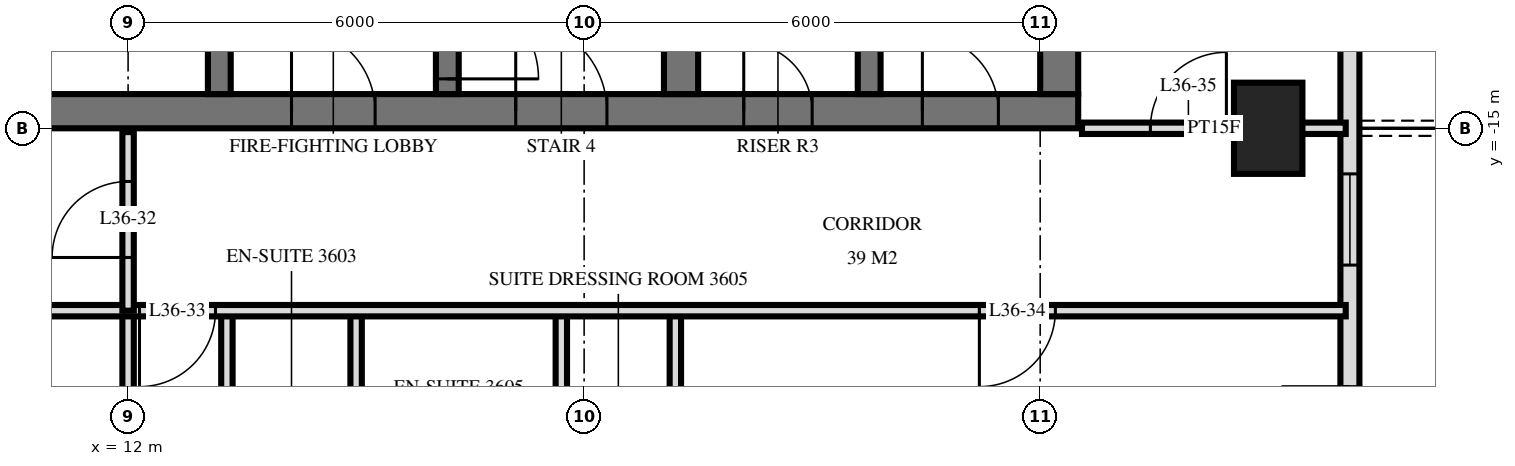
"""IFC4 building model, lengths in metres.
Left out: names, types, materials, properties, quantities, classifications, styles, units other than length and angle.
Written with IfcOpenShell. Run it as: python <this file> out.ifc"""

import sys

from ifc_helpers import new_model, si_unit, direction, frame, frame_2d, origin, origin_2d, place, context, subcontext, project, spatial, rectangle, extrude, element, fill, save


model = new_model("IFC4")
c1 = context("Model", 3, precision=1e-05, world=origin(), true_north=direction((0.0, 1.0)))
c2 = subcontext(c1, "Body", "Model", "MODEL_VIEW")
j1 = project(units=[si_unit("LENGTHUNIT", "METRE"), si_unit("PLANEANGLEUNIT", "RADIAN")], contexts=[c1])
p1 = place(None, origin())
s1 = spatial("IfcSite", under=j1, at=p1, CompositionType="ELEMENT")
p2 = place(p1, origin())
s2 = spatial("IfcBuilding", under=s1, at=p2, CompositionType="ELEMENT")
p3 = place(p2, frame((0.0, 0.0, 141.6)))
s3 = spatial("IfcBuildingStorey", under=s2, at=p3, CompositionType="ELEMENT", Elevation=141.6)
p4 = place(p3, frame((27.0, -15.0, 0.0), z_axis=(0.0, 0.0, 1.0), x_axis=(0.0, 1.0, 0.0)))
e1 = element("IfcColumn", 1, at=p4, inside=s3, PredefinedType="COLUMN", context=c2, shape_type="SweptSolid", body=[
    extrude(rectangle(XDim=1.2, YDim=0.9, at=origin_2d()), origin(), (0.0, 0.0, 1.0), 3.6),
])
p5 = place(p3, frame((10.0, -14.775, 0.0), z_axis=(0.0, 0.0, 1.0), x_axis=(1.0, 0.0, 0.0)))
e2 = element("IfcWall", 2, at=p5, inside=s3, PredefinedType="SHEAR", context=c2, shape_type="SweptSolid", body=[
    extrude(rectangle(XDim=14.5, YDim=0.45, at=frame_2d((7.25, 0.0))), origin(), (0.0, 0.0, 1.0), 3.6),
])
p6 = place(p5, frame((7.1, 0.0, 0.0)))
e3 = element("IfcOpeningElement", 3, at=p6, cuts=e2, PredefinedType="OPENING", context=c2, shape_type="SweptSolid", body=[
    extrude(rectangle(XDim=1.2, YDim=2.1, at=frame_2d((0.6, 1.05))), frame((0.0, 0.235, 0.0), z_axis=(0.0, -1.0, 0.0), x_axis=(1.0, 0.0, 0.0)), (0.0, 0.0, 1.0), 0.47),
])
p7 = place(p5, frame((4.15, 0.0, 0.0)))
e4 = element("IfcOpeningElement", 4, at=p7, cuts=e2, PredefinedType="OPENING", context=c2, shape_type="SweptSolid", body=[
    extrude(rectangle(XDim=1.1, YDim=2.1, at=frame_2d((0.55, 1.05))), frame((0.0, 0.235, 0.0), z_axis=(0.0, -1.0, 0.0), x_axis=(1.0, 0.0, 0.0)), (0.0, 0.0, 1.0), 0.47),
])
p8 = place(p5, frame((10.1, 0.0, 0.0)))
e5 = element("IfcOpeningElement", 5, at=p8, cuts=e2, PredefinedType="OPENING", context=c2, shape_type="SweptSolid", body=[
    extrude(rectangle(XDim=0.9, YDim=2.1, at=frame_2d((0.45, 1.05))), frame((0.0, 0.235, 0.0), z_axis=(0.0, -1.0, 0.0), x_axis=(1.0, 0.0, 0.0)), (0.0, 0.0, 1.0), 0.47),
])
p9 = place(p5, frame((12.45, 0.0, 0.0)))
e6 = element("IfcOpeningElement", 6, at=p9, cuts=e2, PredefinedType="OPENING", context=c2, shape_type="SweptSolid", body=[
    extrude(rectangle(XDim=1.0, YDim=2.1, at=frame_2d((0.5, 1.05))), frame((0.0, 0.235, 0.0), z_axis=(0.0, -1.0, 0.0), x_axis=(1.0, 0.0, 0.0)), (0.0, 0.0, 1.0), 0.47),
])
p10 = place(p3, frame((24.25, -14.55, 0.0), z_axis=(0.0, 0.0, 1.0), x_axis=(0.0, 1.0, 0.0)))
e7 = element("IfcWall", 7, at=p10, inside=s3, PredefinedType="SHEAR", context=c2, shape_type="SweptSolid", body=[
    extrude(rectangle(XDim=14.1, YDim=0.5, at=frame_2d((7.05, 0.0))), origin(), (0.0, 0.0, 1.0), 3.6),
])
p11 = place(p3, frame((13.2, -14.55, 0.0), z_axis=(0.0, 0.0, 1.0), x_axis=(0.0, 1.0, 0.0)))
e8 = element("IfcWall", 8, at=p11, inside=s3, PredefinedType="SHEAR", context=c2, shape_type="SweptSolid", body=[
    extrude(rectangle(XDim=5.4, YDim=0.3, at=frame_2d((2.7, 0.0))), origin(), (0.0, 0.0, 1.0), 3.6),
])
p12 = place(p11, frame((4.0, 0.0, 0.0)))
e9 = element("IfcOpeningElement", 9, at=p12, cuts=e8, PredefinedType="OPENING", context=c2, shape_type="SweptSolid", body=[
    extrude(rectangle(XDim=1.2, YDim=2.1, at=frame_2d((0.6, 1.05))), frame((0.0, 0.16, 0.0), z_axis=(0.0, -1.0, 0.0), x_axis=(1.0, 0.0, 0.0)), (0.0, 0.0, 1.0), 0.32),
])
p13 = place(p3, frame((16.2, -14.55, 0.0), z_axis=(0.0, 0.0, 1.0), x_axis=(0.0, 1.0, 0.0)))
e10 = element("IfcWall", 10, at=p13, inside=s3, PredefinedType="SHEAR", context=c2, shape_type="SweptSolid", body=[
    extrude(rectangle(XDim=5.4, YDim=0.3, at=frame_2d((2.7, 0.0))), origin(), (0.0, 0.0, 1.0), 3.6),
])
p14 = place(p13, frame((0.2, 0.0, 0.0)))
e11 = element("IfcOpeningElement", 11, at=p14, cuts=e10, PredefinedType="OPENING", context=c2, shape_type="SweptSolid", body=[
    extrude(rectangle(XDim=1.2, YDim=2.1, at=frame_2d((0.6, 1.05))), frame((0.0, 0.16, 0.0), z_axis=(0.0, -1.0, 0.0), x_axis=(1.0, 0.0, 0.0)), (0.0, 0.0, 1.0), 0.32),
])
p15 = place(p3, frame((19.275, -14.55, 0.0), z_axis=(0.0, 0.0, 1.0), x_axis=(0.0, 1.0, 0.0)))
e12 = element("IfcWall", 12, at=p15, inside=s3, PredefinedType="SHEAR", context=c2, shape_type="SweptSolid", body=[
    extrude(rectangle(XDim=5.4, YDim=0.45, at=frame_2d((2.7, 0.0))), origin(), (0.0, 0.0, 1.0), 3.6),
])
p16 = place(p3, frame((21.75, -14.55, 0.0), z_axis=(0.0, 0.0, 1.0), x_axis=(0.0, 1.0, 0.0)))
e13 = element("IfcWall", 13, at=p16, inside=s3, PredefinedType="SHEAR", context=c2, shape_type="SweptSolid", body=[
    extrude(rectangle(XDim=5.4, YDim=0.3, at=frame_2d((2.7, 0.0))), origin(), (0.0, 0.0, 1.0), 3.6),
])
p17 = place(p3, frame((28.075, -29.275, 0.0), z_axis=(0.0, 0.0, 1.0), x_axis=(0.0, 1.0, 0.0)))
e14 = element("IfcWall", 14, at=p17, inside=s3, PredefinedType="SOLIDWALL", context=c2, shape_type="SweptSolid", body=[
    extrude(rectangle(XDim=25.951, YDim=0.25, at=frame_2d((12.975, 0.0))), origin(), (0.0, 0.0, 1.0), 3.32),
])
p18 = place(p17, frame((0.575, 0.0, 0.0)))
e15 = element("IfcOpeningElement", 15, at=p18, cuts=e14, PredefinedType="OPENING", context=c2, shape_type="SweptSolid", body=[
    extrude(rectangle(XDim=1.8, YDim=2.4, at=frame_2d((0.9, 1.2))), frame((0.0, 0.135, 0.0), z_axis=(0.0, -1.0, 0.0), x_axis=(1.0, 0.0, 0.0)), (0.0, 0.0, 1.0), 0.27),
])
p19 = place(p17, frame((3.325, 0.0, 0.3)))
e16 = element("IfcOpeningElement", 16, at=p19, cuts=e14, PredefinedType="OPENING", context=c2, shape_type="SweptSolid", body=[
    extrude(rectangle(XDim=1.8, YDim=2.1, at=frame_2d((0.9, 1.05))), frame((0.0, 0.135, 0.0), z_axis=(0.0, -1.0, 0.0), x_axis=(1.0, 0.0, 0.0)), (0.0, 0.0, 1.0), 0.27),
])
p20 = place(p17, frame((5.775, 0.0, 0.3)))
e17 = element("IfcOpeningElement", 17, at=p20, cuts=e14, PredefinedType="OPENING", context=c2, shape_type="SweptSolid", body=[
    extrude(rectangle(XDim=2.4, YDim=2.1, at=frame_2d((1.2, 1.05))), frame((0.0, 0.135, 0.0), z_axis=(0.0, -1.0, 0.0), x_axis=(1.0, 0.0, 0.0)), (0.0, 0.0, 1.0), 0.27),
])
p21 = place(p17, frame((9.075, 0.0, 0.0)))
e18 = element("IfcOpeningElement", 18, at=p21, cuts=e14, PredefinedType="OPENING", context=c2, shape_type="SweptSolid", body=[
    extrude(rectangle(XDim=1.8, YDim=2.4, at=frame_2d((0.9, 1.2))), frame((0.0, 0.135, 0.0), z_axis=(0.0, -1.0, 0.0), x_axis=(1.0, 0.0, 0.0)), (0.0, 0.0, 1.0), 0.27),
])
p22 = place(p17, frame((12.475, 0.0, 0.3)))
e19 = element("IfcOpeningElement", 19, at=p22, cuts=e14, PredefinedType="OPENING", context=c2, shape_type="SweptSolid", body=[
    extrude(rectangle(XDim=1.2, YDim=2.1, at=frame_2d((0.6, 1.05))), frame((0.0, 0.135, 0.0), z_axis=(0.0, -1.0, 0.0), x_axis=(1.0, 0.0, 0.0)), (0.0, 0.0, 1.0), 0.27),
])
p23 = place(p17, frame((17.5, 0.0, 0.0)))
e20 = element("IfcOpeningElement", 20, at=p23, cuts=e14, PredefinedType="OPENING", context=c2, shape_type="SweptSolid", body=[
    extrude(rectangle(XDim=1.8, YDim=2.4, at=frame_2d((0.9, 1.2))), frame((0.0, 0.135, 0.0), z_axis=(0.0, -1.0, 0.0), x_axis=(1.0, 0.0, 0.0)), (0.0, 0.0, 1.0), 0.27),
])
p24 = place(p3, frame((19.2, -20.4, 0.0), z_axis=(0.0, 0.0, 1.0), x_axis=(0.0, 1.0, 0.0)))
e21 = element("IfcWall", 21, at=p24, inside=s3, PredefinedType="PARTITIONING", context=c2, shape_type="SweptSolid", body=[
    extrude(rectangle(XDim=3.0, YDim=0.15, at=frame_2d((1.5, 0.0))), origin(), (0.0, 0.0, 1.0), 3.32),
])
p25 = place(p24, frame((1.05, 0.0, 0.0)))
e22 = element("IfcOpeningElement", 22, at=p25, cuts=e21, PredefinedType="OPENING", context=c2, shape_type="SweptSolid", body=[
    extrude(rectangle(XDim=0.9, YDim=2.1, at=frame_2d((0.45, 1.05))), frame((0.0, 0.085, 0.0), z_axis=(0.0, -1.0, 0.0), x_axis=(1.0, 0.0, 0.0)), (0.0, 0.0, 1.0), 0.17),
])
p26 = place(p3, frame((17.7, -20.4, 0.0), z_axis=(0.0, 0.0, 1.0), x_axis=(0.0, 1.0, 0.0)))
e23 = element("IfcWall", 23, at=p26, inside=s3, PredefinedType="PARTITIONING", context=c2, shape_type="SweptSolid", body=[
    extrude(rectangle(XDim=3.0, YDim=0.15, at=frame_2d((1.5, 0.0))), origin(), (0.0, 0.0, 1.0), 3.32),
])
p27 = place(p3, frame((15.0, -33.62, 0.0), z_axis=(0.0, 0.0, 1.0), x_axis=(0.0, 1.0, 0.0)))
e24 = element("IfcWall", 24, at=p27, inside=s3, PredefinedType="PARTITIONING", context=c2, shape_type="SweptSolid", body=[
    extrude(rectangle(XDim=16.22, YDim=0.15, at=frame_2d((8.11, 0.0))), origin(), (0.0, 0.0, 1.0), 3.32),
])
p28 = place(p3, frame((13.3, -21.2, 0.0), z_axis=(0.0, 0.0, 1.0), x_axis=(0.0, 1.0, 0.0)))
e25 = element("IfcWall", 25, at=p28, inside=s3, PredefinedType="PARTITIONING", context=c2, shape_type="SweptSolid", body=[
    extrude(rectangle(XDim=3.8, YDim=0.15, at=frame_2d((1.9, 0.0))), origin(), (0.0, 0.0, 1.0), 3.32),
])
p29 = place(p28, frame((1.5, 0.0, 0.0)))
e26 = element("IfcOpeningElement", 26, at=p29, cuts=e25, PredefinedType="OPENING", context=c2, shape_type="SweptSolid", body=[
    extrude(rectangle(XDim=0.8, YDim=2.1, at=frame_2d((0.4, 1.05))), frame((0.0, 0.085, 0.0), z_axis=(0.0, -1.0, 0.0), x_axis=(1.0, 0.0, 0.0)), (0.0, 0.0, 1.0), 0.17),
])
p30 = place(p3, frame((12.0, -17.4, 0.0), z_axis=(0.0, 0.0, 1.0), x_axis=(0.0, 1.0, 0.0)))
e27 = element("IfcWall", 27, at=p30, inside=s3, PredefinedType="PARTITIONING", context=c2, shape_type="SweptSolid", body=[
    extrude(rectangle(XDim=2.35, YDim=0.15, at=frame_2d((1.175, 0.0))), origin(), (0.0, 0.0, 1.0), 3.32),
])
p31 = place(p30, frame((0.7, 0.0, 0.0)))
e28 = element("IfcOpeningElement", 28, at=p31, cuts=e27, PredefinedType="OPENING", context=c2, shape_type="SweptSolid", body=[
    extrude(rectangle(XDim=1.0, YDim=2.1, at=frame_2d((0.5, 1.05))), frame((0.0, 0.085, 0.0), z_axis=(0.0, -1.0, 0.0), x_axis=(1.0, 0.0, 0.0)), (0.0, 0.0, 1.0), 0.17),
])
p32 = place(p3, frame((12.0, -33.62, 0.0), z_axis=(0.0, 0.0, 1.0), x_axis=(0.0, 1.0, 0.0)))
e29 = element("IfcWall", 29, at=p32, inside=s3, PredefinedType="PARTITIONING", context=c2, shape_type="SweptSolid", body=[
    extrude(rectangle(XDim=16.22, YDim=0.15, at=frame_2d((8.11, 0.0))), origin(), (0.0, 0.0, 1.0), 3.32),
])
p33 = place(p3, frame((-28.02, -17.4, 0.0), z_axis=(0.0, 0.0, 1.0), x_axis=(1.0, 0.0, 0.0)))
e30 = element("IfcWall", 30, at=p33, inside=s3, PredefinedType="PARTITIONING", context=c2, shape_type="SweptSolid", body=[
    extrude(rectangle(XDim=56.04, YDim=0.15, at=frame_2d((28.02, 0.0))), origin(), (0.0, 0.0, 1.0), 3.32),
])
p34 = place(p33, frame((13.17, 0.0, 0.0)))
e31 = element("IfcOpeningElement", 31, at=p34, cuts=e30, PredefinedType="OPENING", context=c2, shape_type="SweptSolid", body=[
    extrude(rectangle(XDim=1.0, YDim=2.1, at=frame_2d((0.5, 1.05))), frame((0.0, 0.085, 0.0), z_axis=(0.0, -1.0, 0.0), x_axis=(1.0, 0.0, 0.0)), (0.0, 0.0, 1.0), 0.17),
])
p35 = place(p33, frame((11.87, 0.0, 0.0)))
e32 = element("IfcOpeningElement", 32, at=p35, cuts=e30, PredefinedType="OPENING", context=c2, shape_type="SweptSolid", body=[
    extrude(rectangle(XDim=1.0, YDim=2.1, at=frame_2d((0.5, 1.05))), frame((0.0, 0.085, 0.0), z_axis=(0.0, -1.0, 0.0), x_axis=(1.0, 0.0, 0.0)), (0.0, 0.0, 1.0), 0.17),
])
p36 = place(p33, frame((2.32, 0.0, 0.0)))
e33 = element("IfcOpeningElement", 33, at=p36, cuts=e30, PredefinedType="OPENING", context=c2, shape_type="SweptSolid", body=[
    extrude(rectangle(XDim=1.0, YDim=2.1, at=frame_2d((0.5, 1.05))), frame((0.0, 0.085, 0.0), z_axis=(0.0, -1.0, 0.0), x_axis=(1.0, 0.0, 0.0)), (0.0, 0.0, 1.0), 0.17),
])
p37 = place(p33, frame((40.17, 0.0, 0.0)))
e34 = element("IfcOpeningElement", 34, at=p37, cuts=e30, PredefinedType="OPENING", context=c2, shape_type="SweptSolid", body=[
    extrude(rectangle(XDim=1.0, YDim=2.1, at=frame_2d((0.5, 1.05))), frame((0.0, 0.085, 0.0), z_axis=(0.0, -1.0, 0.0), x_axis=(1.0, 0.0, 0.0)), (0.0, 0.0, 1.0), 0.17),
])
p38 = place(p33, frame((51.22, 0.0, 0.0)))
e35 = element("IfcOpeningElement", 35, at=p38, cuts=e30, PredefinedType="OPENING", context=c2, shape_type="SweptSolid", body=[
    extrude(rectangle(XDim=1.0, YDim=2.1, at=frame_2d((0.5, 1.05))), frame((0.0, 0.085, 0.0), z_axis=(0.0, -1.0, 0.0), x_axis=(1.0, 0.0, 0.0)), (0.0, 0.0, 1.0), 0.17),
])
p39 = place(p33, frame((18.52, 0.0, 0.0)))
e36 = element("IfcOpeningElement", 36, at=p39, cuts=e30, PredefinedType="OPENING", context=c2, shape_type="SweptSolid", body=[
    extrude(rectangle(XDim=1.0, YDim=2.1, at=frame_2d((0.5, 1.05))), frame((0.0, 0.085, 0.0), z_axis=(0.0, -1.0, 0.0), x_axis=(1.0, 0.0, 0.0)), (0.0, 0.0, 1.0), 0.17),
])
p40 = place(p33, frame((26.02, 0.0, 0.0)))
e37 = element("IfcOpeningElement", 37, at=p40, cuts=e30, PredefinedType="OPENING", context=c2, shape_type="SweptSolid", body=[
    extrude(rectangle(XDim=1.0, YDim=2.1, at=frame_2d((0.5, 1.05))), frame((0.0, 0.085, 0.0), z_axis=(0.0, -1.0, 0.0), x_axis=(1.0, 0.0, 0.0)), (0.0, 0.0, 1.0), 0.17),
])
p41 = place(p33, frame((35.02, 0.0, 0.0)))
e38 = element("IfcOpeningElement", 38, at=p41, cuts=e30, PredefinedType="OPENING", context=c2, shape_type="SweptSolid", body=[
    extrude(rectangle(XDim=1.0, YDim=2.1, at=frame_2d((0.5, 1.05))), frame((0.0, 0.085, 0.0), z_axis=(0.0, -1.0, 0.0), x_axis=(1.0, 0.0, 0.0)), (0.0, 0.0, 1.0), 0.17),
])
p42 = place(p3, frame((24.55, -15.0, 0.0), z_axis=(0.0, 0.0, 1.0), x_axis=(1.0, 0.0, 0.0)))
e39 = element("IfcWall", 39, at=p42, inside=s3, PredefinedType="PARTITIONING", context=c2, shape_type="SweptSolid", body=[
    extrude(rectangle(XDim=3.47, YDim=0.15, at=frame_2d((1.735, 0.0))), origin(), (0.0, 0.0, 1.0), 3.32),
])
p43 = place(p42, frame((0.9, 0.0, 0.0)))
e40 = element("IfcOpeningElement", 40, at=p43, cuts=e39, PredefinedType="OPENING", context=c2, shape_type="SweptSolid", body=[
    extrude(rectangle(XDim=1.0, YDim=2.1, at=frame_2d((0.5, 1.05))), frame((0.0, 0.085, 0.0), z_axis=(0.0, -1.0, 0.0), x_axis=(1.0, 0.0, 0.0)), (0.0, 0.0, 1.0), 0.17),
])
p44 = place(p22, origin())
e41 = element("IfcWindow", 41, at=p44, inside=s3, PartitioningType="SINGLE_PANEL", PredefinedType="WINDOW", context=c2, shape_type="SweptSolid", body=[
    extrude(rectangle(XDim=1.2, YDim=2.1, at=frame_2d((0.6, 1.05))), frame((0.0, 0.03, 0.0), z_axis=(0.0, -1.0, 0.0), x_axis=(1.0, 0.0, 0.0)), (0.0, 0.0, 1.0), 0.06),
])
fill(e19, e41)
p45 = place(p6, origin())
e42 = element("IfcDoor", 42, at=p45, inside=s3, OperationType="SINGLE_SWING_RIGHT", PredefinedType="DOOR", context=c2, shape_type="SweptSolid", body=[
    extrude(rectangle(XDim=1.2, YDim=2.1, at=frame_2d((0.6, 1.05))), frame((0.0, 0.025, 0.0), z_axis=(0.0, -1.0, 0.0), x_axis=(1.0, 0.0, 0.0)), (0.0, 0.0, 1.0), 0.05),
])
fill(e3, e42)
p46 = place(p7, origin())
e43 = element("IfcDoor", 43, at=p46, inside=s3, OperationType="SINGLE_SWING_RIGHT", PredefinedType="DOOR", context=c2, shape_type="SweptSolid", body=[
    extrude(rectangle(XDim=1.1, YDim=2.1, at=frame_2d((0.55, 1.05))), frame((0.0, 0.025, 0.0), z_axis=(0.0, -1.0, 0.0), x_axis=(1.0, 0.0, 0.0)), (0.0, 0.0, 1.0), 0.05),
])
fill(e4, e43)
p47 = place(p8, origin())
e44 = element("IfcDoor", 44, at=p47, inside=s3, OperationType="SINGLE_SWING_RIGHT", PredefinedType="DOOR", context=c2, shape_type="SweptSolid", body=[
    extrude(rectangle(XDim=0.9, YDim=2.1, at=frame_2d((0.45, 1.05))), frame((0.0, 0.025, 0.0), z_axis=(0.0, -1.0, 0.0), x_axis=(1.0, 0.0, 0.0)), (0.0, 0.0, 1.0), 0.05),
])
fill(e5, e44)
p48 = place(p9, origin())
e45 = element("IfcDoor", 45, at=p48, inside=s3, OperationType="SINGLE_SWING_RIGHT", PredefinedType="DOOR", context=c2, shape_type="SweptSolid", body=[
    extrude(rectangle(XDim=1.0, YDim=2.1, at=frame_2d((0.5, 1.05))), frame((0.0, 0.025, 0.0), z_axis=(0.0, -1.0, 0.0), x_axis=(1.0, 0.0, 0.0)), (0.0, 0.0, 1.0), 0.05),
])
fill(e6, e45)
p49 = place(p14, frame((0.6, 0.0, 0.0), z_axis=(0.0, 0.0, 1.0), x_axis=(-1.0, 0.0, 0.0)))
e46 = element("IfcDoor", 46, at=p49, inside=s3, OperationType="SINGLE_SWING_LEFT", PredefinedType="DOOR", context=c2, shape_type="SweptSolid", body=[
    extrude(rectangle(XDim=1.2, YDim=2.1, at=frame_2d((0.0, 1.05))), frame((0.0, -0.025, 0.0), z_axis=(0.0, 1.0, 0.0), x_axis=(-1.0, 0.0, 0.0)), (0.0, 0.0, 1.0), 0.05),
])
fill(e11, e46)
p50 = place(p31, origin())
e47 = element("IfcDoor", 47, at=p50, inside=s3, OperationType="SINGLE_SWING_RIGHT", PredefinedType="DOOR", context=c2, shape_type="SweptSolid", body=[
    extrude(rectangle(XDim=1.0, YDim=2.1, at=frame_2d((0.5, 1.05))), frame((0.0, 0.025, 0.0), z_axis=(0.0, -1.0, 0.0), x_axis=(1.0, 0.0, 0.0)), (0.0, 0.0, 1.0), 0.05),
])
fill(e28, e47)
p51 = place(p37, frame((0.5, 0.0, 0.0), z_axis=(0.0, 0.0, 1.0), x_axis=(-1.0, 0.0, 0.0)))
e48 = element("IfcDoor", 48, at=p51, inside=s3, OperationType="SINGLE_SWING_LEFT", PredefinedType="DOOR", context=c2, shape_type="SweptSolid", body=[
    extrude(rectangle(XDim=1.0, YDim=2.1, at=frame_2d((0.0, 1.05))), frame((0.0, -0.025, 0.0), z_axis=(0.0, 1.0, 0.0), x_axis=(-1.0, 0.0, 0.0)), (0.0, 0.0, 1.0), 0.05),
])
fill(e34, e48)
p52 = place(p38, frame((0.5, 0.0, 0.0), z_axis=(0.0, 0.0, 1.0), x_axis=(-1.0, 0.0, 0.0)))
e49 = element("IfcDoor", 49, at=p52, inside=s3, OperationType="SINGLE_SWING_LEFT", PredefinedType="DOOR", context=c2, shape_type="SweptSolid", body=[
    extrude(rectangle(XDim=1.0, YDim=2.1, at=frame_2d((0.0, 1.05))), frame((0.0, -0.025, 0.0), z_axis=(0.0, 1.0, 0.0), x_axis=(-1.0, 0.0, 0.0)), (0.0, 0.0, 1.0), 0.05),
])
fill(e35, e49)
p53 = place(p43, origin())
e50 = element("IfcDoor", 50, at=p53, inside=s3, OperationType="SINGLE_SWING_LEFT", PredefinedType="DOOR", context=c2, shape_type="SweptSolid", body=[
    extrude(rectangle(XDim=1.0, YDim=2.1, at=frame_2d((0.5, 1.05))), frame((0.0, 0.025, 0.0), z_axis=(0.0, -1.0, 0.0), x_axis=(1.0, 0.0, 0.0)), (0.0, 0.0, 1.0), 0.05),
])
fill(e40, e50)
save(model, sys.argv[1])
